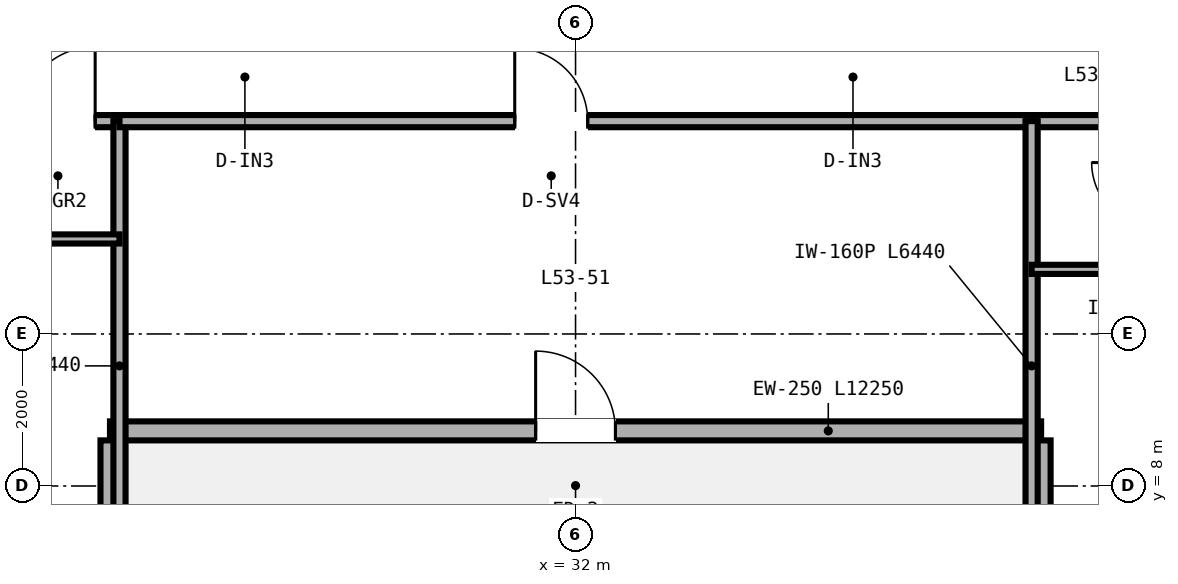
"""IFC4 building model, lengths in metres.
Left out: names, types, materials, properties, quantities, classifications, styles, units other than length and angle.
Written with IfcOpenShell. Run it as: python <this file> out.ifc"""

import sys

from ifc_helpers import new_model, si_unit, direction, frame, frame_2d, origin, place, context, subcontext, project, spatial, rectangle, extrude, source, transform, mapped, element, fill, save


model = new_model("IFC4")
c1 = context("Model", 3, precision=1e-05, world=origin(), true_north=direction((0.0, 1.0)))
c2 = subcontext(c1, "Body", "Model", "MODEL_VIEW")
j1 = project(units=[si_unit("LENGTHUNIT", "METRE"), si_unit("PLANEANGLEUNIT", "RADIAN")], contexts=[c1])
p1 = place(None, origin())
s1 = spatial("IfcSite", under=j1, at=p1, CompositionType="ELEMENT")
p2 = place(p1, origin())
s2 = spatial("IfcBuilding", under=s1, at=p2, CompositionType="ELEMENT")
p3 = place(p2, frame((0.0, 0.0, 210.0)))
s3 = spatial("IfcBuildingStorey", under=s2, at=p3, CompositionType="ELEMENT", Elevation=210.0)
p4 = place(p3, frame((25.875, 8.725, 0.0), z_axis=(0.0, 0.0, 1.0), x_axis=(1.0, 0.0, 0.0)))
e1 = element("IfcWall", 1, at=p4, inside=s3, PredefinedType="SOLIDWALL", context=c2, shape_type="SweptSolid", body=[
    extrude(rectangle(XDim=12.25, YDim=0.25, at=frame_2d((6.125, 0.0))), origin(), (0.0, 0.0, 1.0), 3.37),
])
p5 = place(p4, frame((5.6, 0.0, 0.0)))
e2 = element("IfcOpeningElement", 2, at=p5, cuts=e1, PredefinedType="OPENING", context=c2, shape_type="SweptSolid", body=[
    extrude(rectangle(XDim=1.05, YDim=2.15, at=frame_2d((0.525, 1.075))), frame((0.0, 0.135, 0.0), z_axis=(0.0, -1.0, 0.0), x_axis=(1.0, 0.0, 0.0)), (0.0, 0.0, 1.0), 0.27),
])
for number, where, z_axis, x_axis in (
    (3, (25.875, 6.1, 0.0), (0.0, 0.0, 1.0), (0.0, 1.0, 0.0)),
    (4, (38.125, 6.1, 0.0), (0.0, 0.0, 1.0), (0.0, 1.0, 0.0)),
):
    element("IfcWall", number, at=place(p3, frame(where, z_axis=z_axis, x_axis=x_axis)), inside=s3, PredefinedType="SOLIDWALL", context=c2, shape_type="SweptSolid", body=[
        extrude(rectangle(XDim=2.5, YDim=0.25, at=frame_2d((1.25, 0.0))), origin(), (0.0, 0.0, 1.0), 2.443),
    ])
p6 = place(p3, frame((14.0, 12.8, 0.0), z_axis=(0.0, 0.0, 1.0), x_axis=(1.0, 0.0, 0.0)))
e5 = element("IfcWall", 5, at=p6, inside=s3, PredefinedType="PARTITIONING", context=c2, shape_type="SweptSolid", body=[
    extrude(rectangle(XDim=12.0, YDim=0.16, at=frame_2d((6.0, 0.0))), origin(), (0.0, 0.0, 1.0), 2.913),
])
p7 = place(p6, frame((3.34, 0.0, 0.0)))
e6 = element("IfcOpeningElement", 6, at=p7, cuts=e5, PredefinedType="OPENING", context=c2, shape_type="SweptSolid", body=[
    extrude(rectangle(XDim=0.94, YDim=2.15, at=frame_2d((0.47, 1.075))), frame((0.0, 0.09, 0.0), z_axis=(0.0, -1.0, 0.0), x_axis=(1.0, 0.0, 0.0)), (0.0, 0.0, 1.0), 0.18),
])
p8 = place(p6, frame((10.7, 0.0, 0.0)))
e7 = element("IfcOpeningElement", 7, at=p8, cuts=e5, PredefinedType="OPENING", context=c2, shape_type="SweptSolid", body=[
    extrude(rectangle(XDim=0.98, YDim=2.2, at=frame_2d((0.49, 1.1))), frame((0.0, 0.09, 0.0), z_axis=(0.0, -1.0, 0.0), x_axis=(1.0, 0.0, 0.0)), (0.0, 0.0, 1.0), 0.18),
])
p9 = place(p3, frame((26.0, 6.36, 0.0), z_axis=(0.0, 0.0, 1.0), x_axis=(0.0, 1.0, 0.0)))
e8 = element("IfcWall", 8, at=p9, inside=s3, PredefinedType="PARTITIONING", context=c2, shape_type="SweptSolid", body=[
    extrude(rectangle(XDim=6.44, YDim=0.16, at=frame_2d((3.22, 0.0))), origin(), (0.0, 0.0, 1.0), 2.443),
])
p10 = place(p3, frame((24.9, 11.25, 0.0), z_axis=(0.0, 0.0, 1.0), x_axis=(1.0, 0.0, 0.0)))
e9 = element("IfcWall", 9, at=p10, inside=s3, PredefinedType="PARTITIONING", context=c2, shape_type="SweptSolid", body=[
    extrude(rectangle(XDim=1.1, YDim=0.12, at=frame_2d((0.55, 0.0))), origin(), (0.0, 0.0, 1.0), 3.37),
])
p11 = place(p3, frame((26.0, 12.8, 0.0), z_axis=(0.0, 0.0, 1.0), x_axis=(1.0, 0.0, 0.0)))
e10 = element("IfcWall", 10, at=p11, inside=s3, PredefinedType="PARTITIONING", context=c2, shape_type="SweptSolid", body=[
    extrude(rectangle(XDim=12.0, YDim=0.16, at=frame_2d((6.0, 0.0))), origin(), (0.0, 0.0, 1.0), 3.37),
])
p12 = place(p11, frame((5.2, 0.0, 0.0)))
e11 = element("IfcOpeningElement", 11, at=p12, cuts=e10, PredefinedType="OPENING", context=c2, shape_type="SweptSolid", body=[
    extrude(rectangle(XDim=0.96, YDim=2.15, at=frame_2d((0.48, 1.075))), frame((0.0, 0.09, 0.0), z_axis=(0.0, -1.0, 0.0), x_axis=(1.0, 0.0, 0.0)), (0.0, 0.0, 1.0), 0.18),
])
p13 = place(p3, frame((38.0, 12.8, 0.0), z_axis=(0.0, 0.0, 1.0), x_axis=(1.0, 0.0, 0.0)))
e12 = element("IfcWall", 12, at=p13, inside=s3, PredefinedType="PARTITIONING", context=c2, shape_type="SweptSolid", body=[
    extrude(rectangle(XDim=12.0, YDim=0.16, at=frame_2d((6.0, 0.0))), origin(), (0.0, 0.0, 1.0), 2.913),
])
p14 = place(p13, frame((3.14, 0.0, 0.0)))
e13 = element("IfcOpeningElement", 13, at=p14, cuts=e12, PredefinedType="OPENING", context=c2, shape_type="SweptSolid", body=[
    extrude(rectangle(XDim=0.94, YDim=2.15, at=frame_2d((0.47, 1.075))), frame((0.0, 0.09, 0.0), z_axis=(0.0, -1.0, 0.0), x_axis=(1.0, 0.0, 0.0)), (0.0, 0.0, 1.0), 0.18),
])
p15 = place(p13, frame((6.94, 0.0, 0.0)))
e14 = element("IfcOpeningElement", 14, at=p15, cuts=e12, PredefinedType="OPENING", context=c2, shape_type="SweptSolid", body=[
    extrude(rectangle(XDim=0.94, YDim=2.15, at=frame_2d((0.47, 1.075))), frame((0.0, 0.09, 0.0), z_axis=(0.0, -1.0, 0.0), x_axis=(1.0, 0.0, 0.0)), (0.0, 0.0, 1.0), 0.18),
])
p16 = place(p13, frame((10.74, 0.0, 0.0)))
e15 = element("IfcOpeningElement", 15, at=p16, cuts=e12, PredefinedType="OPENING", context=c2, shape_type="SweptSolid", body=[
    extrude(rectangle(XDim=0.94, YDim=2.15, at=frame_2d((0.47, 1.075))), frame((0.0, 0.09, 0.0), z_axis=(0.0, -1.0, 0.0), x_axis=(1.0, 0.0, 0.0)), (0.0, 0.0, 1.0), 0.18),
])
p17 = place(p3, frame((38.0, 6.36, 0.0), z_axis=(0.0, 0.0, 1.0), x_axis=(0.0, 1.0, 0.0)))
e16 = element("IfcWall", 16, at=p17, inside=s3, PredefinedType="PARTITIONING", context=c2, shape_type="SweptSolid", body=[
    extrude(rectangle(XDim=6.44, YDim=0.16, at=frame_2d((3.22, 0.0))), origin(), (0.0, 0.0, 1.0), 2.443),
])
p18 = place(p3, frame((38.0, 10.85, 0.0), z_axis=(0.0, 0.0, 1.0), x_axis=(1.0, 0.0, 0.0)))
e17 = element("IfcWall", 17, at=p18, inside=s3, PredefinedType="PARTITIONING", context=c2, shape_type="SweptSolid", body=[
    extrude(rectangle(XDim=1.65, YDim=0.12, at=frame_2d((0.825, 0.0))), origin(), (0.0, 0.0, 1.0), 3.37),
])
m1 = source(origin(), c2, "Body", "SweptSolid", [
    extrude(rectangle(XDim=1.05, YDim=2.15, at=frame_2d((0.525, 1.075))), frame((0.0, 0.025, 0.0), z_axis=(0.0, -1.0, 0.0), x_axis=(1.0, 0.0, 0.0)), (0.0, 0.0, 1.0), 0.05),
])
p19 = place(p5, origin())
e18 = element("IfcDoor", 18, at=p19, inside=s3, OperationType="SINGLE_SWING_LEFT", PredefinedType="DOOR", context=c2, shape_type="MappedRepresentation", body=[
    mapped(m1, transform((0.0, 0.0, 0.0), scale=1.0)),
])
fill(e2, e18)
m2 = source(origin(), c2, "Body", "SweptSolid", [
    extrude(rectangle(XDim=0.98, YDim=2.2, at=frame_2d((0.49, 1.1))), frame((0.0, 0.025, 0.0), z_axis=(0.0, -1.0, 0.0), x_axis=(1.0, 0.0, 0.0)), (0.0, 0.0, 1.0), 0.05),
])
p20 = place(p8, origin())
e19 = element("IfcDoor", 19, at=p20, inside=s3, OperationType="SINGLE_SWING_RIGHT", PredefinedType="DOOR", context=c2, shape_type="MappedRepresentation", body=[
    mapped(m2, transform((0.0, 0.0, 0.0), scale=1.0)),
])
fill(e7, e19)
m3 = source(origin(), c2, "Body", "SweptSolid", [
    extrude(rectangle(XDim=0.96, YDim=2.15, at=frame_2d((0.48, 1.075))), frame((0.0, 0.025, 0.0), z_axis=(0.0, -1.0, 0.0), x_axis=(1.0, 0.0, 0.0)), (0.0, 0.0, 1.0), 0.05),
])
p21 = place(p12, origin())
e20 = element("IfcDoor", 20, at=p21, inside=s3, OperationType="SINGLE_SWING_LEFT", PredefinedType="DOOR", context=c2, shape_type="MappedRepresentation", body=[
    mapped(m3, transform((0.0, 0.0, 0.0), scale=1.0)),
])
fill(e11, e20)
save(model, sys.argv[1])
